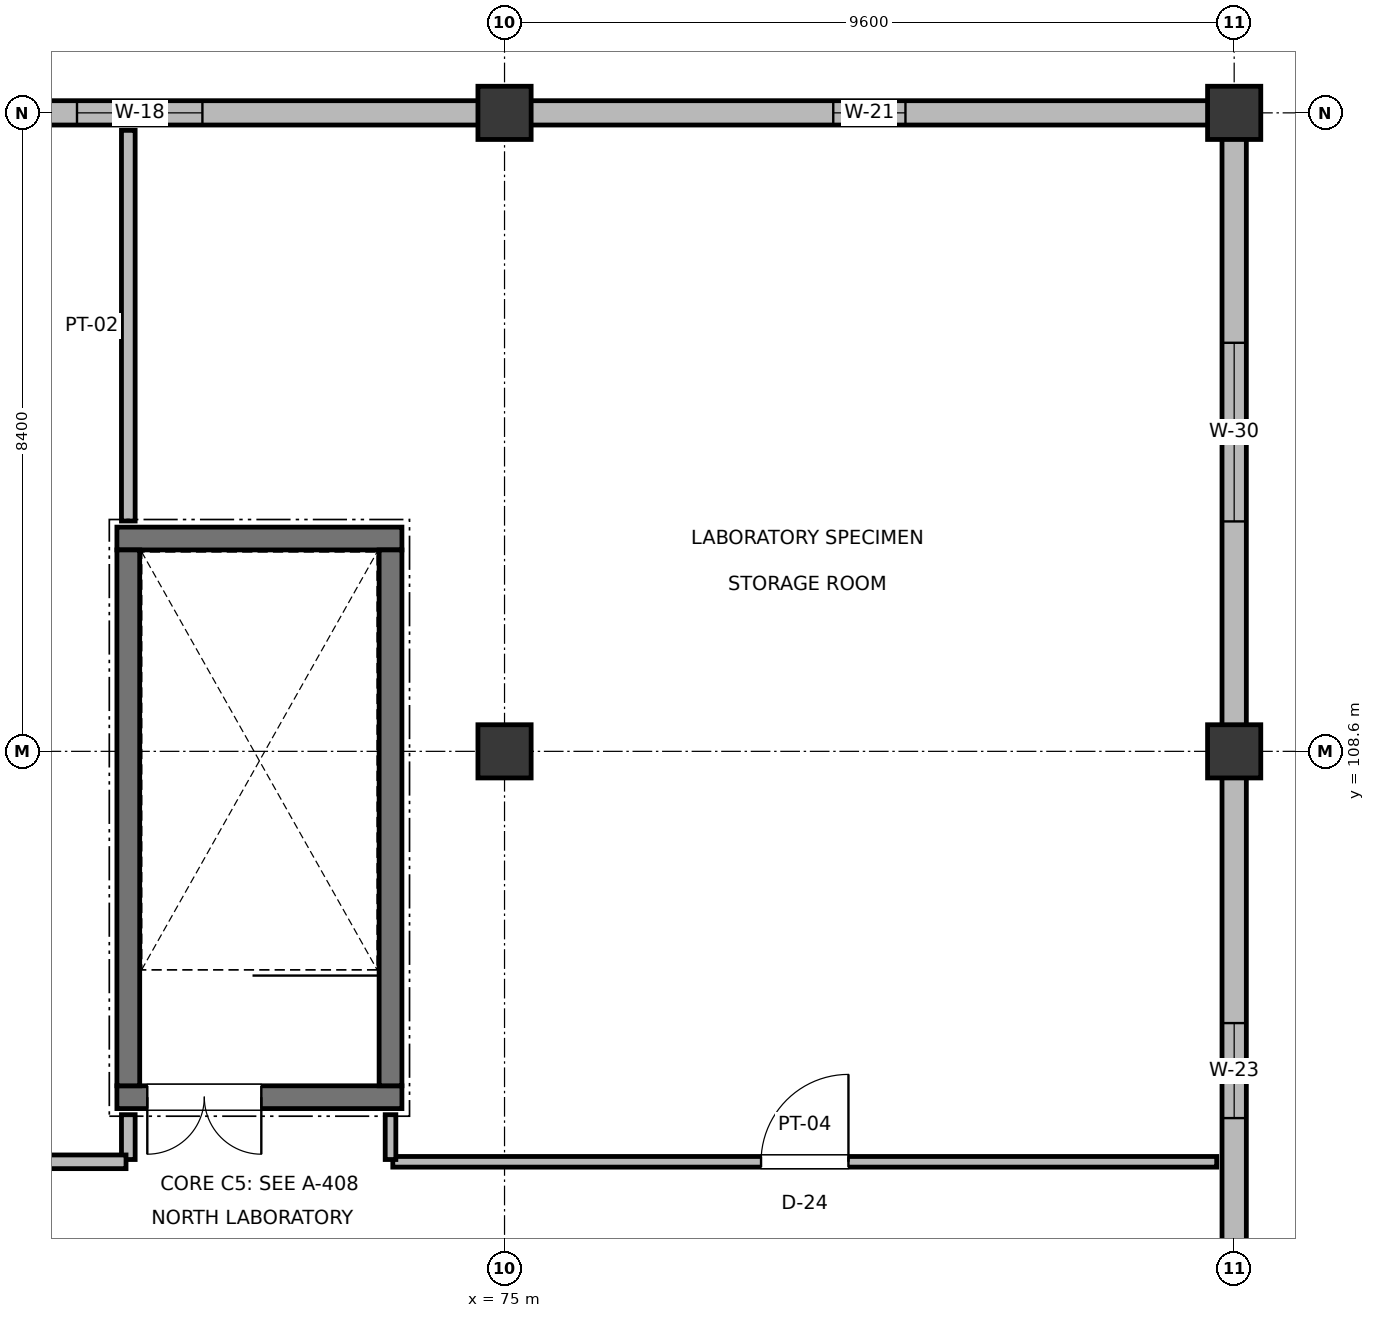
"""IFC4 building model, lengths in metres.
Left out: names, types, materials, properties, quantities, classifications, styles, units other than length and angle.
Written with IfcOpenShell. Run it as: python <this file> out.ifc"""

import sys

from ifc_helpers import new_model, si_unit, direction, frame, frame_2d, origin, origin_2d, place, context, subcontext, project, spatial, rectangle, extrude, element, fill, save


model = new_model("IFC4")
c1 = context("Model", 3, precision=1e-05, world=origin(), true_north=direction((0.0, 1.0)))
c2 = subcontext(c1, "Body", "Model", "MODEL_VIEW")
j1 = project(units=[si_unit("LENGTHUNIT", "METRE"), si_unit("PLANEANGLEUNIT", "RADIAN")], contexts=[c1])
p1 = place(None, origin())
s1 = spatial("IfcSite", under=j1, at=p1, CompositionType="ELEMENT")
p2 = place(p1, origin())
s2 = spatial("IfcBuilding", under=s1, at=p2, CompositionType="ELEMENT")
p3 = place(p2, frame((0.0, 0.0, 5.4)))
s3 = spatial("IfcBuildingStorey", under=s2, at=p3, CompositionType="ELEMENT", Elevation=5.4)
for number, where, z_axis, x_axis in (
    (1, (75.0, 108.6, 0.0), (0.0, 0.0, 1.0), (1.0, 0.0, 0.0)),
    (2, (75.0, 117.0, 0.0), (0.0, 0.0, 1.0), (1.0, 0.0, 0.0)),
    (3, (84.6, 108.6, 0.0), (0.0, 0.0, 1.0), (1.0, 0.0, 0.0)),
    (4, (84.6, 117.0, 0.0), (0.0, 0.0, 1.0), (1.0, 0.0, 0.0)),
):
    element("IfcColumn", number, at=place(p3, frame(where, z_axis=z_axis, x_axis=x_axis)), inside=s3, PredefinedType="COLUMN", context=c2, shape_type="SweptSolid", body=[
        extrude(rectangle(XDim=0.7, YDim=0.7, at=origin_2d()), origin(), (0.0, 0.0, 1.0), 4.8),
    ])
p4 = place(p3, frame((65.735, 117.0, 0.0), z_axis=(0.0, 0.0, 1.0), x_axis=(1.0, 0.0, 0.0)))
e5 = element("IfcWall", 5, at=p4, inside=s3, PredefinedType="SOLIDWALL", context=c2, shape_type="SweptSolid", body=[
    extrude(rectangle(XDim=8.93, YDim=0.32, at=frame_2d((4.465, 0.0))), origin(), (0.0, 0.0, 1.0), 3.845),
])
p5 = place(p4, frame((3.64, 0.0, 0.9)))
e6 = element("IfcOpeningElement", 6, at=p5, cuts=e5, PredefinedType="OPENING", context=c2, shape_type="SweptSolid", body=[
    extrude(rectangle(XDim=1.65, YDim=1.65, at=frame_2d((0.825, 0.825))), frame((0.0, 0.17, 0.0), z_axis=(0.0, -1.0, 0.0), x_axis=(1.0, 0.0, 0.0)), (0.0, 0.0, 1.0), 0.34),
])
p6 = place(p3, frame((75.335, 117.0, 0.0), z_axis=(0.0, 0.0, 1.0), x_axis=(1.0, 0.0, 0.0)))
e7 = element("IfcWall", 7, at=p6, inside=s3, PredefinedType="SOLIDWALL", context=c2, shape_type="SweptSolid", body=[
    extrude(rectangle(XDim=8.93, YDim=0.32, at=frame_2d((4.465, 0.0))), origin(), (0.0, 0.0, 1.0), 3.845),
])
p7 = place(p6, frame((3.99, 0.0, 0.9)))
e8 = element("IfcOpeningElement", 8, at=p7, cuts=e7, PredefinedType="OPENING", context=c2, shape_type="SweptSolid", body=[
    extrude(rectangle(XDim=0.95, YDim=1.7, at=frame_2d((0.475, 0.85))), frame((0.0, 0.17, 0.0), z_axis=(0.0, -1.0, 0.0), x_axis=(1.0, 0.0, 0.0)), (0.0, 0.0, 1.0), 0.34),
])
p8 = place(p3, frame((84.6, 100.535, 0.0), z_axis=(0.0, 0.0, 1.0), x_axis=(0.0, 1.0, 0.0)))
e9 = element("IfcWall", 9, at=p8, inside=s3, PredefinedType="SOLIDWALL", context=c2, shape_type="SweptSolid", body=[
    extrude(rectangle(XDim=7.73, YDim=0.32, at=frame_2d((3.865, 0.0))), origin(), (0.0, 0.0, 1.0), 3.895),
])
p9 = place(p8, frame((3.24, 0.0, 0.9)))
e10 = element("IfcOpeningElement", 10, at=p9, cuts=e9, PredefinedType="OPENING", context=c2, shape_type="SweptSolid", body=[
    extrude(rectangle(XDim=1.25, YDim=1.8, at=frame_2d((0.625, 0.9))), frame((0.0, 0.17, 0.0), z_axis=(0.0, -1.0, 0.0), x_axis=(1.0, 0.0, 0.0)), (0.0, 0.0, 1.0), 0.34),
])
p10 = place(p3, frame((84.6, 108.935, 0.0), z_axis=(0.0, 0.0, 1.0), x_axis=(0.0, 1.0, 0.0)))
e11 = element("IfcWall", 11, at=p10, inside=s3, PredefinedType="SOLIDWALL", context=c2, shape_type="SweptSolid", body=[
    extrude(rectangle(XDim=7.73, YDim=0.32, at=frame_2d((3.865, 0.0))), origin(), (0.0, 0.0, 1.0), 3.895),
])
p11 = place(p10, frame((2.69, 0.0, 0.9)))
e12 = element("IfcOpeningElement", 12, at=p11, cuts=e11, PredefinedType="OPENING", context=c2, shape_type="SweptSolid", body=[
    extrude(rectangle(XDim=2.35, YDim=1.9, at=frame_2d((1.175, 0.95))), frame((0.0, 0.17, 0.0), z_axis=(0.0, -1.0, 0.0), x_axis=(1.0, 0.0, 0.0)), (0.0, 0.0, 1.0), 0.34),
])
p12 = place(p3, frame((69.9, 104.05, 0.0), z_axis=(0.0, 0.0, 1.0), x_axis=(1.0, 0.0, 0.0)))
e13 = element("IfcWall", 13, at=p12, inside=s3, PredefinedType="SHEAR", context=c2, shape_type="SweptSolid", body=[
    extrude(rectangle(XDim=3.75, YDim=0.3, at=frame_2d((1.875, 0.0))), origin(), (0.0, 0.0, 1.0), 4.58),
])
p13 = place(p12, frame((0.4, 0.0, 0.0)))
e14 = element("IfcOpeningElement", 14, at=p13, cuts=e13, PredefinedType="OPENING", context=c2, shape_type="SweptSolid", body=[
    extrude(rectangle(XDim=1.5, YDim=2.2, at=frame_2d((0.75, 1.1))), frame((0.0, 0.16, 0.0), z_axis=(0.0, -1.0, 0.0), x_axis=(1.0, 0.0, 0.0)), (0.0, 0.0, 1.0), 0.32),
])
p14 = place(p3, frame((69.9, 111.4, 0.0), z_axis=(0.0, 0.0, 1.0), x_axis=(1.0, 0.0, 0.0)))
e15 = element("IfcWall", 15, at=p14, inside=s3, PredefinedType="SHEAR", context=c2, shape_type="SweptSolid", body=[
    extrude(rectangle(XDim=3.75, YDim=0.3, at=frame_2d((1.875, 0.0))), origin(), (0.0, 0.0, 1.0), 4.58),
])
for number, where, z_axis, x_axis in (
    (16, (70.05, 104.2, 0.0), (0.0, 0.0, 1.0), (0.0, 1.0, 0.0)),
    (17, (73.5, 104.2, 0.0), (0.0, 0.0, 1.0), (0.0, 1.0, 0.0)),
):
    element("IfcWall", number, at=place(p3, frame(where, z_axis=z_axis, x_axis=x_axis)), inside=s3, PredefinedType="SHEAR", context=c2, shape_type="SweptSolid", body=[
        extrude(rectangle(XDim=7.05, YDim=0.3, at=frame_2d((3.525, 0.0))), origin(), (0.0, 0.0, 1.0), 4.58),
    ])
p15 = place(p3, frame((70.05, 111.63, 0.0), z_axis=(0.0, 0.0, 1.0), x_axis=(0.0, 1.0, 0.0)))
e18 = element("IfcWall", 18, at=p15, inside=s3, PredefinedType="PARTITIONING", context=c2, shape_type="SweptSolid", body=[
    extrude(rectangle(XDim=5.14, YDim=0.18, at=frame_2d((2.57, 0.0))), origin(), (0.0, 0.0, 1.0), 3.845),
])
p16 = place(p3, frame((70.05, 103.23, 0.0), z_axis=(0.0, 0.0, 1.0), x_axis=(0.0, 1.0, 0.0)))
e19 = element("IfcWall", 19, at=p16, inside=s3, PredefinedType="PARTITIONING", context=c2, shape_type="SweptSolid", body=[
    extrude(rectangle(XDim=0.59, YDim=0.18, at=frame_2d((0.295, 0.0))), origin(), (0.0, 0.0, 1.0), 4.48),
])
p17 = place(p3, frame((53.53, 103.2, 0.0), z_axis=(0.0, 0.0, 1.0), x_axis=(1.0, 0.0, 0.0)))
e20 = element("IfcWall", 20, at=p17, inside=s3, PredefinedType="PARTITIONING", context=c2, shape_type="SweptSolid", body=[
    extrude(rectangle(XDim=16.49, YDim=0.18, at=frame_2d((8.245, 0.0))), origin(), (0.0, 0.0, 1.0), 3.895),
])
p18 = place(p17, frame((7.72, 0.0, 0.0)))
e21 = element("IfcOpeningElement", 21, at=p18, cuts=e20, PredefinedType="OPENING", context=c2, shape_type="SweptSolid", body=[
    extrude(rectangle(XDim=1.05, YDim=2.2, at=frame_2d((0.525, 1.1))), frame((0.0, 0.1, 0.0), z_axis=(0.0, -1.0, 0.0), x_axis=(1.0, 0.0, 0.0)), (0.0, 0.0, 1.0), 0.2),
])
p19 = place(p3, frame((73.53, 103.2, 0.0), z_axis=(0.0, 0.0, 1.0), x_axis=(1.0, 0.0, 0.0)))
e22 = element("IfcWall", 22, at=p19, inside=s3, PredefinedType="PARTITIONING", context=c2, shape_type="SweptSolid", body=[
    extrude(rectangle(XDim=10.84, YDim=0.14, at=frame_2d((5.42, 0.0))), origin(), (0.0, 0.0, 1.0), 3.895),
])
p20 = place(p19, frame((4.845, 0.0, 0.0)))
e23 = element("IfcOpeningElement", 23, at=p20, cuts=e22, PredefinedType="OPENING", context=c2, shape_type="SweptSolid", body=[
    extrude(rectangle(XDim=1.15, YDim=2.15, at=frame_2d((0.575, 1.075))), frame((0.0, 0.08, 0.0), z_axis=(0.0, -1.0, 0.0), x_axis=(1.0, 0.0, 0.0)), (0.0, 0.0, 1.0), 0.16),
])
p21 = place(p3, frame((73.5, 103.23, 0.0), z_axis=(0.0, 0.0, 1.0), x_axis=(0.0, 1.0, 0.0)))
e24 = element("IfcWall", 24, at=p21, inside=s3, PredefinedType="PARTITIONING", context=c2, shape_type="SweptSolid", body=[
    extrude(rectangle(XDim=0.59, YDim=0.14, at=frame_2d((0.295, 0.0))), origin(), (0.0, 0.0, 1.0), 4.48),
])
p22 = place(p5, origin())
e25 = element("IfcWindow", 25, at=p22, inside=s3, PartitioningType="SINGLE_PANEL", PredefinedType="WINDOW", context=c2, shape_type="SweptSolid", body=[
    extrude(rectangle(XDim=1.65, YDim=1.65, at=frame_2d((0.825, 0.825))), frame((0.0, 0.03, 0.0), z_axis=(0.0, -1.0, 0.0), x_axis=(1.0, 0.0, 0.0)), (0.0, 0.0, 1.0), 0.06),
])
fill(e6, e25)
p23 = place(p7, origin())
e26 = element("IfcWindow", 26, at=p23, inside=s3, PartitioningType="DOUBLE_PANEL_VERTICAL", PredefinedType="WINDOW", context=c2, shape_type="SweptSolid", body=[
    extrude(rectangle(XDim=0.95, YDim=1.7, at=frame_2d((0.475, 0.85))), frame((0.0, 0.03, 0.0), z_axis=(0.0, -1.0, 0.0), x_axis=(1.0, 0.0, 0.0)), (0.0, 0.0, 1.0), 0.06),
])
fill(e8, e26)
p24 = place(p9, frame((1.25, 0.0, 0.0), z_axis=(0.0, 0.0, 1.0), x_axis=(-1.0, 0.0, 0.0)))
e27 = element("IfcWindow", 27, at=p24, inside=s3, PartitioningType="DOUBLE_PANEL_VERTICAL", PredefinedType="WINDOW", context=c2, shape_type="SweptSolid", body=[
    extrude(rectangle(XDim=1.25, YDim=1.8, at=frame_2d((0.625, 0.9))), frame((0.0, 0.03, 0.0), z_axis=(0.0, -1.0, 0.0), x_axis=(1.0, 0.0, 0.0)), (0.0, 0.0, 1.0), 0.06),
])
fill(e10, e27)
p25 = place(p11, frame((2.35, 0.0, 0.0), z_axis=(0.0, 0.0, 1.0), x_axis=(-1.0, 0.0, 0.0)))
e28 = element("IfcWindow", 28, at=p25, inside=s3, PartitioningType="DOUBLE_PANEL_VERTICAL", PredefinedType="WINDOW", context=c2, shape_type="SweptSolid", body=[
    extrude(rectangle(XDim=2.35, YDim=1.9, at=frame_2d((1.175, 0.95))), frame((0.0, 0.03, 0.0), z_axis=(0.0, -1.0, 0.0), x_axis=(1.0, 0.0, 0.0)), (0.0, 0.0, 1.0), 0.06),
])
fill(e12, e28)
p26 = place(p13, frame((1.5, 0.0, 0.0), z_axis=(0.0, 0.0, 1.0), x_axis=(-1.0, 0.0, 0.0)))
e29 = element("IfcDoor", 29, at=p26, inside=s3, OperationType="DOUBLE_DOOR_SINGLE_SWING", PredefinedType="DOOR", context=c2, shape_type="SweptSolid", body=[
    extrude(rectangle(XDim=1.5, YDim=2.2, at=frame_2d((0.75, 1.1))), frame((0.0, 0.025, 0.0), z_axis=(0.0, -1.0, 0.0), x_axis=(1.0, 0.0, 0.0)), (0.0, 0.0, 1.0), 0.05),
])
fill(e14, e29)
p27 = place(p20, origin())
e30 = element("IfcDoor", 30, at=p27, inside=s3, OperationType="SINGLE_SWING_RIGHT", PredefinedType="DOOR", context=c2, shape_type="SweptSolid", body=[
    extrude(rectangle(XDim=1.15, YDim=2.15, at=frame_2d((0.575, 1.075))), frame((0.0, 0.025, 0.0), z_axis=(0.0, -1.0, 0.0), x_axis=(1.0, 0.0, 0.0)), (0.0, 0.0, 1.0), 0.05),
])
fill(e23, e30)
save(model, sys.argv[1])
